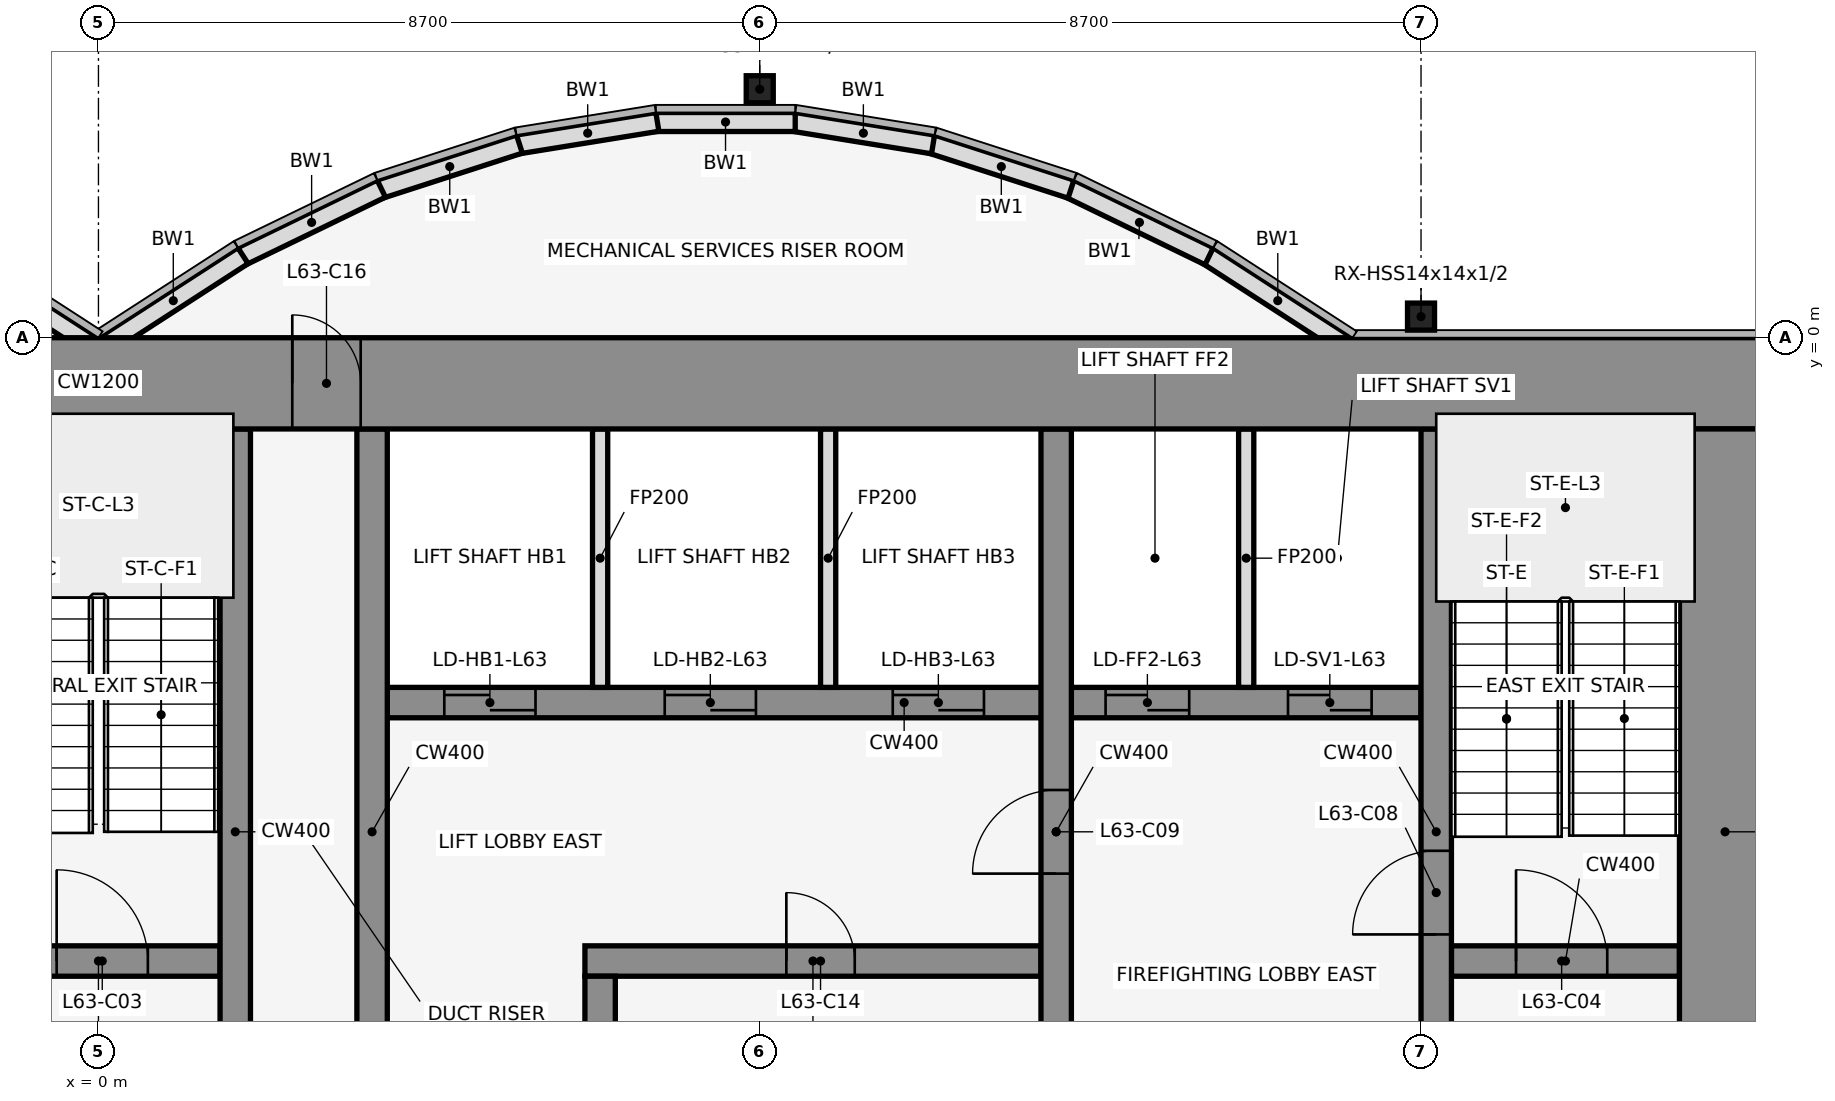
"""IFC4 building model, lengths in metres.
Left out: names, types, materials, properties, quantities, classifications, styles, units other than length and angle.
Written with IfcOpenShell. Run it as: python <this file> out.ifc"""

import sys

from ifc_helpers import new_model, si_unit, direction, frame, frame_2d, origin, origin_2d, place, context, subcontext, project, spatial, rectangle, hollow_rectangle, extrude, element, fill, save


model = new_model("IFC4")
c1 = context("Model", 3, precision=1e-05, world=origin(), true_north=direction((0.0, 1.0)))
c2 = subcontext(c1, "Body", "Model", "MODEL_VIEW")
j1 = project(units=[si_unit("LENGTHUNIT", "METRE"), si_unit("PLANEANGLEUNIT", "RADIAN")], contexts=[c1])
p1 = place(None, origin())
s1 = spatial("IfcSite", under=j1, at=p1, CompositionType="ELEMENT")
p2 = place(p1, origin())
s2 = spatial("IfcBuilding", under=s1, at=p2, CompositionType="ELEMENT")
p3 = place(p2, frame((0.0, 0.0, 279.2)))
s3 = spatial("IfcBuildingStorey", under=s2, at=p3, CompositionType="ELEMENT", Elevation=279.2)
for number, where, z_axis, x_axis in (
    (1, (8.7, 3.269, 0.0), (0.0, 0.0, 1.0), (1.0, 0.0, 0.0)),
    (2, (17.4, 0.278, 0.0), (0.0, 0.0, 1.0), (1.0, 0.0, 0.0)),
):
    element("IfcColumn", number, at=place(p3, frame(where, z_axis=z_axis, x_axis=x_axis)), inside=s3, PredefinedType="COLUMN", context=c2, shape_type="SweptSolid", body=[
        extrude(hollow_rectangle(XDim=0.356, YDim=0.356, WallThickness=0.012, at=origin_2d()), origin(), (0.0, 0.0, 1.0), 4.2),
    ])
p4 = place(p3, frame((16.432, -0.105, 0.0), z_axis=(0.0, 0.0, 1.0), x_axis=(-0.83981312244, 0.542875602121, 0.0)))
e3 = element("IfcWall", 3, at=p4, inside=s3, PredefinedType="STANDARD", context=c2, shape_type="SweptSolid", body=[
    extrude(rectangle(XDim=2.183, YDim=0.25, at=frame_2d((1.091, 0.0))), origin(), (0.0, 0.0, 1.0), 4.05),
])
p5 = place(p3, frame((14.612, 1.073, 0.0), z_axis=(0.0, 0.0, 1.0), x_axis=(-0.89982408427, 0.436252928206, 0.0)))
e4 = element("IfcWall", 4, at=p5, inside=s3, PredefinedType="STANDARD", context=c2, shape_type="SweptSolid", body=[
    extrude(rectangle(XDim=2.038, YDim=0.25, at=frame_2d((1.019, 0.0))), origin(), (0.0, 0.0, 1.0), 4.05),
])
p6 = place(p3, frame((12.795, 1.955, 0.0), z_axis=(0.0, 0.0, 1.0), x_axis=(-0.951495806175, 0.307661714928, 0.0)))
e5 = element("IfcWall", 5, at=p6, inside=s3, PredefinedType="STANDARD", context=c2, shape_type="SweptSolid", body=[
    extrude(rectangle(XDim=1.927, YDim=0.25, at=frame_2d((0.963, 0.0))), origin(), (0.0, 0.0, 1.0), 4.05),
])
p7 = place(p3, frame((10.98, 2.543, 0.0), z_axis=(0.0, 0.0, 1.0), x_axis=(-0.987181718931, 0.159600293885, 0.0)))
e6 = element("IfcWall", 6, at=p7, inside=s3, PredefinedType="STANDARD", context=c2, shape_type="SweptSolid", body=[
    extrude(rectangle(XDim=1.857, YDim=0.25, at=frame_2d((0.929, 0.0))), origin(), (0.0, 0.0, 1.0), 4.05),
])
p8 = place(p3, frame((9.167, 2.838, 0.0), z_axis=(0.0, 0.0, 1.0), x_axis=(-1.0, 0.0, 0.0)))
e7 = element("IfcWall", 7, at=p8, inside=s3, PredefinedType="STANDARD", context=c2, shape_type="SweptSolid", body=[
    extrude(rectangle(XDim=1.833, YDim=0.25, at=frame_2d((0.917, 0.0))), origin(), (0.0, 0.0, 1.0), 4.05),
])
p9 = place(p3, frame((7.353, 2.84, 0.0), z_axis=(0.0, 0.0, 1.0), x_axis=(-0.987181718931, -0.159600293885, 0.0)))
e8 = element("IfcWall", 8, at=p9, inside=s3, PredefinedType="STANDARD", context=c2, shape_type="SweptSolid", body=[
    extrude(rectangle(XDim=1.857, YDim=0.25, at=frame_2d((0.929, 0.0))), origin(), (0.0, 0.0, 1.0), 4.05),
])
p10 = place(p3, frame((5.538, 2.548, 0.0), z_axis=(0.0, 0.0, 1.0), x_axis=(-0.951495806175, -0.307661714928, 0.0)))
e9 = element("IfcWall", 9, at=p10, inside=s3, PredefinedType="STANDARD", context=c2, shape_type="SweptSolid", body=[
    extrude(rectangle(XDim=1.927, YDim=0.25, at=frame_2d((0.963, 0.0))), origin(), (0.0, 0.0, 1.0), 4.05),
])
p11 = place(p3, frame((3.721, 1.962, 0.0), z_axis=(0.0, 0.0, 1.0), x_axis=(-0.89982408427, -0.436252928206, 0.0)))
e10 = element("IfcWall", 10, at=p11, inside=s3, PredefinedType="STANDARD", context=c2, shape_type="SweptSolid", body=[
    extrude(rectangle(XDim=2.038, YDim=0.25, at=frame_2d((1.019, 0.0))), origin(), (0.0, 0.0, 1.0), 4.05),
])
for number, where, z_axis, x_axis in (
    (11, (1.901, 1.08, 0.0), (0.0, 0.0, 1.0), (-0.84, -0.543, 0.0)),
    (12, (-0.068, -0.105, 0.0), (0.0, 0.0, 1.0), (-0.84, 0.543, 0.0)),
):
    element("IfcWall", number, at=place(p3, frame(where, z_axis=z_axis, x_axis=x_axis)), inside=s3, PredefinedType="STANDARD", context=c2, shape_type="SweptSolid", body=[
        extrude(rectangle(XDim=2.183, YDim=0.25, at=frame_2d((1.091, 0.0))), origin(), (0.0, 0.0, 1.0), 4.05),
    ])
p12 = place(p3, frame((-1.6, -8.2, 0.0), z_axis=(0.0, 0.0, 1.0), x_axis=(1.0, 0.0, 0.0)))
e13 = element("IfcWall", 13, at=p12, inside=s3, PredefinedType="SHEAR", context=c2, shape_type="SweptSolid", body=[
    extrude(rectangle(XDim=3.2, YDim=0.4, at=frame_2d((1.6, 0.0))), origin(), (0.0, 0.0, 1.0), 4.2),
])
p13 = place(p12, frame((1.05, 0.0, 0.0)))
e14 = element("IfcOpeningElement", 14, at=p13, cuts=e13, PredefinedType="OPENING", context=c2, shape_type="SweptSolid", body=[
    extrude(rectangle(XDim=1.2, YDim=2.1, at=frame_2d((0.6, 1.05))), frame((0.0, 0.212, 0.0), z_axis=(0.0, -1.0, 0.0), x_axis=(1.0, 0.0, 0.0)), (0.0, 0.0, 1.0), 0.424),
])
p14 = place(p3, frame((6.4, -8.2, 0.0), z_axis=(0.0, 0.0, 1.0), x_axis=(1.0, 0.0, 0.0)))
e15 = element("IfcWall", 15, at=p14, inside=s3, PredefinedType="SHEAR", context=c2, shape_type="SweptSolid", body=[
    extrude(rectangle(XDim=6.0, YDim=0.4, at=frame_2d((3.0, 0.0))), origin(), (0.0, 0.0, 1.0), 4.2),
])
p15 = place(p14, frame((2.65, 0.0, 0.0)))
e16 = element("IfcOpeningElement", 16, at=p15, cuts=e15, PredefinedType="OPENING", context=c2, shape_type="SweptSolid", body=[
    extrude(rectangle(XDim=0.9, YDim=2.1, at=frame_2d((0.45, 1.05))), frame((0.0, 0.212, 0.0), z_axis=(0.0, -1.0, 0.0), x_axis=(1.0, 0.0, 0.0)), (0.0, 0.0, 1.0), 0.424),
])
p16 = place(p3, frame((17.8, -8.2, 0.0), z_axis=(0.0, 0.0, 1.0), x_axis=(1.0, 0.0, 0.0)))
e17 = element("IfcWall", 17, at=p16, inside=s3, PredefinedType="SHEAR", context=c2, shape_type="SweptSolid", body=[
    extrude(rectangle(XDim=3.0, YDim=0.4, at=frame_2d((1.5, 0.0))), origin(), (0.0, 0.0, 1.0), 4.2),
])
p17 = place(p16, frame((0.85, 0.0, 0.0)))
e18 = element("IfcOpeningElement", 18, at=p17, cuts=e17, PredefinedType="OPENING", context=c2, shape_type="SweptSolid", body=[
    extrude(rectangle(XDim=1.2, YDim=2.1, at=frame_2d((0.6, 1.05))), frame((0.0, 0.212, 0.0), z_axis=(0.0, -1.0, 0.0), x_axis=(1.0, 0.0, 0.0)), (0.0, 0.0, 1.0), 0.424),
])
p18 = place(p3, frame((3.8, -4.8, 0.0), z_axis=(0.0, 0.0, 1.0), x_axis=(1.0, 0.0, 0.0)))
e19 = element("IfcWall", 19, at=p18, inside=s3, PredefinedType="SHEAR", context=c2, shape_type="SweptSolid", body=[
    extrude(rectangle(XDim=13.6, YDim=0.4, at=frame_2d((6.8, 0.0))), origin(), (0.0, 0.0, 1.0), 4.2),
])
p19 = place(p18, frame((0.75, 0.0, 0.0)))
e20 = element("IfcOpeningElement", 20, at=p19, cuts=e19, PredefinedType="OPENING", context=c2, shape_type="SweptSolid", body=[
    extrude(rectangle(XDim=1.2, YDim=2.1, at=frame_2d((0.6, 1.05))), frame((0.0, 0.212, 0.0), z_axis=(0.0, -1.0, 0.0), x_axis=(1.0, 0.0, 0.0)), (0.0, 0.0, 1.0), 0.424),
])
p20 = place(p18, frame((3.65, 0.0, 0.0)))
e21 = element("IfcOpeningElement", 21, at=p20, cuts=e19, PredefinedType="OPENING", context=c2, shape_type="SweptSolid", body=[
    extrude(rectangle(XDim=1.2, YDim=2.1, at=frame_2d((0.6, 1.05))), frame((0.0, 0.212, 0.0), z_axis=(0.0, -1.0, 0.0), x_axis=(1.0, 0.0, 0.0)), (0.0, 0.0, 1.0), 0.424),
])
p21 = place(p18, frame((6.65, 0.0, 0.0)))
e22 = element("IfcOpeningElement", 22, at=p21, cuts=e19, PredefinedType="OPENING", context=c2, shape_type="SweptSolid", body=[
    extrude(rectangle(XDim=1.2, YDim=2.1, at=frame_2d((0.6, 1.05))), frame((0.0, 0.212, 0.0), z_axis=(0.0, -1.0, 0.0), x_axis=(1.0, 0.0, 0.0)), (0.0, 0.0, 1.0), 0.424),
])
p22 = place(p18, frame((9.45, 0.0, 0.0)))
e23 = element("IfcOpeningElement", 23, at=p22, cuts=e19, PredefinedType="OPENING", context=c2, shape_type="SweptSolid", body=[
    extrude(rectangle(XDim=1.1, YDim=2.1, at=frame_2d((0.55, 1.05))), frame((0.0, 0.212, 0.0), z_axis=(0.0, -1.0, 0.0), x_axis=(1.0, 0.0, 0.0)), (0.0, 0.0, 1.0), 0.424),
])
p23 = place(p18, frame((11.85, 0.0, 0.0)))
e24 = element("IfcOpeningElement", 24, at=p23, cuts=e19, PredefinedType="OPENING", context=c2, shape_type="SweptSolid", body=[
    extrude(rectangle(XDim=1.1, YDim=2.1, at=frame_2d((0.55, 1.05))), frame((0.0, 0.212, 0.0), z_axis=(0.0, -1.0, 0.0), x_axis=(1.0, 0.0, 0.0)), (0.0, 0.0, 1.0), 0.424),
])
p24 = place(p3, frame((1.8, -11.8, 0.0), z_axis=(0.0, 0.0, 1.0), x_axis=(0.0, 1.0, 0.0)))
e25 = element("IfcWall", 25, at=p24, inside=s3, PredefinedType="SHEAR", context=c2, shape_type="SweptSolid", body=[
    extrude(rectangle(XDim=10.6, YDim=0.4, at=frame_2d((5.3, 0.0))), origin(), (0.0, 0.0, 1.0), 4.2),
])
p25 = place(p3, frame((3.6, -11.8, 0.0), z_axis=(0.0, 0.0, 1.0), x_axis=(0.0, 1.0, 0.0)))
e26 = element("IfcWall", 26, at=p25, inside=s3, PredefinedType="SHEAR", context=c2, shape_type="SweptSolid", body=[
    extrude(rectangle(XDim=10.6, YDim=0.4, at=frame_2d((5.3, 0.0))), origin(), (0.0, 0.0, 1.0), 4.2),
])
p26 = place(p25, frame((1.35, 0.0, 0.0)))
e27 = element("IfcOpeningElement", 27, at=p26, cuts=e26, PredefinedType="OPENING", context=c2, shape_type="SweptSolid", body=[
    extrude(rectangle(XDim=0.9, YDim=2.1, at=frame_2d((0.45, 1.05))), frame((0.0, 0.212, 0.0), z_axis=(0.0, -1.0, 0.0), x_axis=(1.0, 0.0, 0.0)), (0.0, 0.0, 1.0), 0.424),
])
p27 = place(p3, frame((6.6, -11.8, 0.0), z_axis=(0.0, 0.0, 1.0), x_axis=(0.0, 1.0, 0.0)))
e28 = element("IfcWall", 28, at=p27, inside=s3, PredefinedType="SHEAR", context=c2, shape_type="SweptSolid", body=[
    extrude(rectangle(XDim=3.4, YDim=0.4, at=frame_2d((1.7, 0.0))), origin(), (0.0, 0.0, 1.0), 4.2),
])
for number, where, z_axis, x_axis in (
    (29, (6.6, -4.6, 0.0), (0.0, 0.0, 1.0), (0.0, 1.0, 0.0)),
    (30, (9.6, -4.6, 0.0), (0.0, 0.0, 1.0), (0.0, 1.0, 0.0)),
):
    element("IfcWall", number, at=place(p3, frame(where, z_axis=z_axis, x_axis=x_axis)), inside=s3, PredefinedType="PARTITIONING", context=c2, shape_type="SweptSolid", body=[
        extrude(rectangle(XDim=3.4, YDim=0.2, at=frame_2d((1.7, 0.0))), origin(), (0.0, 0.0, 1.0), 3.04),
    ])
p28 = place(p3, frame((12.6, -11.8, 0.0), z_axis=(0.0, 0.0, 1.0), x_axis=(0.0, 1.0, 0.0)))
e31 = element("IfcWall", 31, at=p28, inside=s3, PredefinedType="SHEAR", context=c2, shape_type="SweptSolid", body=[
    extrude(rectangle(XDim=10.6, YDim=0.4, at=frame_2d((5.3, 0.0))), origin(), (0.0, 0.0, 1.0), 4.2),
])
p29 = place(p28, frame((4.75, 0.0, 0.0)))
e32 = element("IfcOpeningElement", 32, at=p29, cuts=e31, PredefinedType="OPENING", context=c2, shape_type="SweptSolid", body=[
    extrude(rectangle(XDim=1.1, YDim=2.1, at=frame_2d((0.55, 1.05))), frame((0.0, 0.212, 0.0), z_axis=(0.0, -1.0, 0.0), x_axis=(1.0, 0.0, 0.0)), (0.0, 0.0, 1.0), 0.424),
])
p30 = place(p3, frame((15.1, -4.6, 0.0), z_axis=(0.0, 0.0, 1.0), x_axis=(0.0, 1.0, 0.0)))
e33 = element("IfcWall", 33, at=p30, inside=s3, PredefinedType="PARTITIONING", context=c2, shape_type="SweptSolid", body=[
    extrude(rectangle(XDim=3.4, YDim=0.2, at=frame_2d((1.7, 0.0))), origin(), (0.0, 0.0, 1.0), 3.04),
])
p31 = place(p3, frame((17.6, -11.8, 0.0), z_axis=(0.0, 0.0, 1.0), x_axis=(0.0, 1.0, 0.0)))
e34 = element("IfcWall", 34, at=p31, inside=s3, PredefinedType="SHEAR", context=c2, shape_type="SweptSolid", body=[
    extrude(rectangle(XDim=10.6, YDim=0.4, at=frame_2d((5.3, 0.0))), origin(), (0.0, 0.0, 1.0), 4.2),
])
p32 = place(p31, frame((1.25, 0.0, 0.0)))
e35 = element("IfcOpeningElement", 35, at=p32, cuts=e34, PredefinedType="OPENING", context=c2, shape_type="SweptSolid", body=[
    extrude(rectangle(XDim=1.1, YDim=2.1, at=frame_2d((0.55, 1.05))), frame((0.0, 0.212, 0.0), z_axis=(0.0, -1.0, 0.0), x_axis=(1.0, 0.0, 0.0)), (0.0, 0.0, 1.0), 0.424),
])
p33 = place(p31, frame((3.95, 0.0, 0.0)))
e36 = element("IfcOpeningElement", 36, at=p33, cuts=e34, PredefinedType="OPENING", context=c2, shape_type="SweptSolid", body=[
    extrude(rectangle(XDim=1.1, YDim=2.1, at=frame_2d((0.55, 1.05))), frame((0.0, 0.212, 0.0), z_axis=(0.0, -1.0, 0.0), x_axis=(1.0, 0.0, 0.0)), (0.0, 0.0, 1.0), 0.424),
])
p34 = place(p3, frame((-22.0, -0.6, 0.0), z_axis=(0.0, 0.0, 1.0), x_axis=(1.0, 0.0, 0.0)))
e37 = element("IfcWall", 37, at=p34, inside=s3, PredefinedType="SHEAR", context=c2, shape_type="SweptSolid", body=[
    extrude(rectangle(XDim=44.0, YDim=1.2, at=frame_2d((22.0, 0.0))), origin(), (0.0, 0.0, 1.0), 4.2),
])
p35 = place(p34, frame((18.55, 0.0, 0.0)))
e38 = element("IfcOpeningElement", 38, at=p35, cuts=e37, PredefinedType="OPENING", context=c2, shape_type="SweptSolid", body=[
    extrude(rectangle(XDim=0.9, YDim=2.1, at=frame_2d((0.45, 1.05))), frame((0.0, 0.612, 0.0), z_axis=(0.0, -1.0, 0.0), x_axis=(1.0, 0.0, 0.0)), (0.0, 0.0, 1.0), 1.224),
])
p36 = place(p34, frame((24.55, 0.0, 0.0)))
e39 = element("IfcOpeningElement", 39, at=p36, cuts=e37, PredefinedType="OPENING", context=c2, shape_type="SweptSolid", body=[
    extrude(rectangle(XDim=0.9, YDim=2.1, at=frame_2d((0.45, 1.05))), frame((0.0, 0.612, 0.0), z_axis=(0.0, -1.0, 0.0), x_axis=(1.0, 0.0, 0.0)), (0.0, 0.0, 1.0), 1.224),
])
p37 = place(p3, frame((21.4, -11.8, 0.0), z_axis=(0.0, 0.0, 1.0), x_axis=(0.0, 1.0, 0.0)))
e40 = element("IfcWall", 40, at=p37, inside=s3, PredefinedType="SHEAR", context=c2, shape_type="SweptSolid", body=[
    extrude(rectangle(XDim=10.6, YDim=1.2, at=frame_2d((5.3, 0.0))), origin(), (0.0, 0.0, 1.0), 4.2),
])
p38 = place(p13, origin())
e41 = element("IfcDoor", 41, at=p38, inside=s3, OperationType="SINGLE_SWING_LEFT", PredefinedType="DOOR", context=c2, shape_type="SweptSolid", body=[
    extrude(rectangle(XDim=1.2, YDim=2.1, at=frame_2d((0.6, 1.05))), frame((0.0, 0.025, 0.0), z_axis=(0.0, -1.0, 0.0), x_axis=(1.0, 0.0, 0.0)), (0.0, 0.0, 1.0), 0.05),
])
fill(e14, e41)
p39 = place(p17, origin())
e42 = element("IfcDoor", 42, at=p39, inside=s3, OperationType="SINGLE_SWING_RIGHT", PredefinedType="DOOR", context=c2, shape_type="SweptSolid", body=[
    extrude(rectangle(XDim=1.2, YDim=2.1, at=frame_2d((0.6, 1.05))), frame((0.0, 0.025, 0.0), z_axis=(0.0, -1.0, 0.0), x_axis=(1.0, 0.0, 0.0)), (0.0, 0.0, 1.0), 0.05),
])
fill(e18, e42)
p40 = place(p19, origin())
e43 = element("IfcDoor", 43, at=p40, inside=s3, OperationType="DOUBLE_DOOR_SLIDING", PredefinedType="DOOR", context=c2, shape_type="SweptSolid", body=[
    extrude(rectangle(XDim=1.2, YDim=2.1, at=frame_2d((0.6, 1.05))), frame((0.0, 0.025, 0.0), z_axis=(0.0, -1.0, 0.0), x_axis=(1.0, 0.0, 0.0)), (0.0, 0.0, 1.0), 0.05),
])
fill(e20, e43)
p41 = place(p20, origin())
e44 = element("IfcDoor", 44, at=p41, inside=s3, OperationType="DOUBLE_DOOR_SLIDING", PredefinedType="DOOR", context=c2, shape_type="SweptSolid", body=[
    extrude(rectangle(XDim=1.2, YDim=2.1, at=frame_2d((0.6, 1.05))), frame((0.0, 0.025, 0.0), z_axis=(0.0, -1.0, 0.0), x_axis=(1.0, 0.0, 0.0)), (0.0, 0.0, 1.0), 0.05),
])
fill(e21, e44)
p42 = place(p21, origin())
e45 = element("IfcDoor", 45, at=p42, inside=s3, OperationType="DOUBLE_DOOR_SLIDING", PredefinedType="DOOR", context=c2, shape_type="SweptSolid", body=[
    extrude(rectangle(XDim=1.2, YDim=2.1, at=frame_2d((0.6, 1.05))), frame((0.0, 0.025, 0.0), z_axis=(0.0, -1.0, 0.0), x_axis=(1.0, 0.0, 0.0)), (0.0, 0.0, 1.0), 0.05),
])
fill(e22, e45)
p43 = place(p22, origin())
e46 = element("IfcDoor", 46, at=p43, inside=s3, OperationType="DOUBLE_DOOR_SLIDING", PredefinedType="DOOR", context=c2, shape_type="SweptSolid", body=[
    extrude(rectangle(XDim=1.1, YDim=2.1, at=frame_2d((0.55, 1.05))), frame((0.0, 0.025, 0.0), z_axis=(0.0, -1.0, 0.0), x_axis=(1.0, 0.0, 0.0)), (0.0, 0.0, 1.0), 0.05),
])
fill(e23, e46)
p44 = place(p23, origin())
e47 = element("IfcDoor", 47, at=p44, inside=s3, OperationType="DOUBLE_DOOR_SLIDING", PredefinedType="DOOR", context=c2, shape_type="SweptSolid", body=[
    extrude(rectangle(XDim=1.1, YDim=2.1, at=frame_2d((0.55, 1.05))), frame((0.0, 0.025, 0.0), z_axis=(0.0, -1.0, 0.0), x_axis=(1.0, 0.0, 0.0)), (0.0, 0.0, 1.0), 0.05),
])
fill(e24, e47)
p45 = place(p33, origin())
e48 = element("IfcDoor", 48, at=p45, inside=s3, OperationType="SINGLE_SWING_RIGHT", PredefinedType="DOOR", context=c2, shape_type="SweptSolid", body=[
    extrude(rectangle(XDim=1.1, YDim=2.1, at=frame_2d((0.55, 1.05))), frame((0.0, 0.025, 0.0), z_axis=(0.0, -1.0, 0.0), x_axis=(1.0, 0.0, 0.0)), (0.0, 0.0, 1.0), 0.05),
])
fill(e36, e48)
p46 = place(p29, frame((1.1, 0.0, 0.0), z_axis=(0.0, 0.0, 1.0), x_axis=(-1.0, 0.0, 0.0)))
e49 = element("IfcDoor", 49, at=p46, inside=s3, OperationType="SINGLE_SWING_RIGHT", PredefinedType="DOOR", context=c2, shape_type="SweptSolid", body=[
    extrude(rectangle(XDim=1.1, YDim=2.1, at=frame_2d((0.55, 1.05))), frame((0.0, 0.025, 0.0), z_axis=(0.0, -1.0, 0.0), x_axis=(1.0, 0.0, 0.0)), (0.0, 0.0, 1.0), 0.05),
])
fill(e32, e49)
p47 = place(p15, frame((0.9, 0.0, 0.0), z_axis=(0.0, 0.0, 1.0), x_axis=(-1.0, 0.0, 0.0)))
e50 = element("IfcDoor", 50, at=p47, inside=s3, OperationType="SINGLE_SWING_LEFT", PredefinedType="DOOR", context=c2, shape_type="SweptSolid", body=[
    extrude(rectangle(XDim=0.9, YDim=2.1, at=frame_2d((0.45, 1.05))), frame((0.0, 0.025, 0.0), z_axis=(0.0, -1.0, 0.0), x_axis=(1.0, 0.0, 0.0)), (0.0, 0.0, 1.0), 0.05),
])
fill(e16, e50)
p48 = place(p36, origin())
e51 = element("IfcDoor", 51, at=p48, inside=s3, OperationType="SINGLE_SWING_LEFT", PredefinedType="DOOR", context=c2, shape_type="SweptSolid", body=[
    extrude(rectangle(XDim=0.9, YDim=2.1, at=frame_2d((0.45, 1.05))), frame((0.0, 0.025, 0.0), z_axis=(0.0, -1.0, 0.0), x_axis=(1.0, 0.0, 0.0)), (0.0, 0.0, 1.0), 0.05),
])
fill(e39, e51)
save(model, sys.argv[1])
